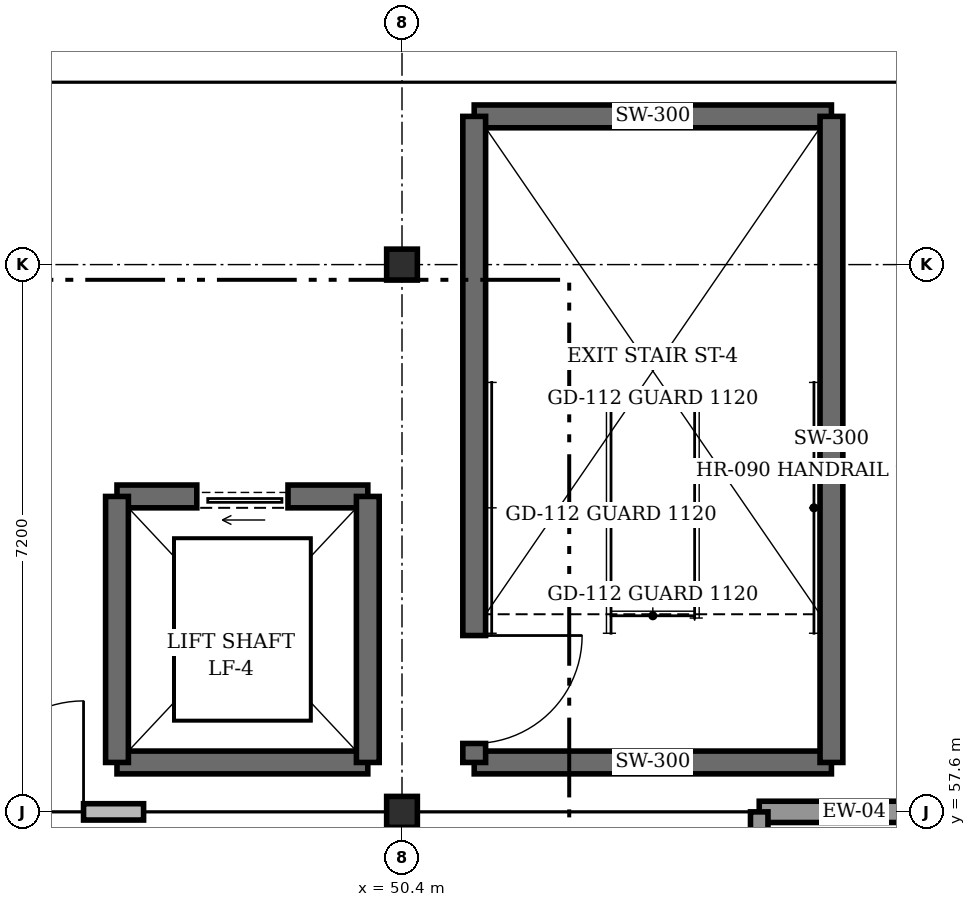
"""IFC4 building model, lengths in metres.
Left out: names, types, materials, properties, quantities, classifications, styles, units other than length and angle.
Written with IfcOpenShell. Run it as: python <this file> out.ifc"""

import sys

from ifc_helpers import new_model, si_unit, direction, frame, frame_2d, origin, origin_2d, place, context, subcontext, project, spatial, rectangle, i_section, extrude, element, fill, save


model = new_model("IFC4")
c1 = context("Model", 3, precision=1e-05, world=origin(), true_north=direction((0.0, 1.0)))
c2 = subcontext(c1, "Body", "Model", "MODEL_VIEW")
j1 = project(units=[si_unit("LENGTHUNIT", "METRE"), si_unit("PLANEANGLEUNIT", "RADIAN")], contexts=[c1])
p1 = place(None, origin())
s1 = spatial("IfcSite", under=j1, at=p1, CompositionType="ELEMENT")
p2 = place(p1, origin())
s2 = spatial("IfcBuilding", under=s1, at=p2, CompositionType="ELEMENT")
p3 = place(p2, frame((0.0, 0.0, 6.0)))
s3 = spatial("IfcBuildingStorey", under=s2, at=p3, CompositionType="ELEMENT", Elevation=6.0)
for number, where, z_axis, x_axis in (
    (1, (50.4, 57.6, 0.0), (0.0, 0.0, 1.0), (1.0, 0.0, 0.0)),
    (2, (50.4, 64.8, 0.0), (0.0, 0.0, 1.0), (1.0, 0.0, 0.0)),
):
    element("IfcColumn", number, at=place(p3, frame(where, z_axis=z_axis, x_axis=x_axis)), inside=s3, PredefinedType="COLUMN", context=c2, shape_type="SweptSolid", body=[
        extrude(i_section(OverallWidth=0.404, OverallDepth=0.407, WebThickness=0.027, FlangeThickness=0.044, at=origin_2d()), origin(), (0.0, 0.0, 1.0), 4.2),
    ])
p4 = place(p3, frame((55.1, 57.6, 0.0), z_axis=(0.0, 0.0, 1.0), x_axis=(1.0, 0.0, 0.0)))
e3 = element("IfcWall", 3, at=p4, inside=s3, PredefinedType="STANDARD", context=c2, shape_type="SweptSolid", body=[
    extrude(rectangle(XDim=2.5, YDim=0.28, at=frame_2d((1.25, 0.0))), origin(), (0.0, 0.0, 1.0), 3.0),
])
p5 = place(p3, frame((55.1, 50.6, 0.0), z_axis=(0.0, 0.0, 1.0), x_axis=(0.0, 1.0, 0.0)))
e4 = element("IfcWall", 4, at=p5, inside=s3, PredefinedType="STANDARD", context=c2, shape_type="SweptSolid", body=[
    extrude(rectangle(XDim=7.0, YDim=0.23, at=frame_2d((3.5, 0.0))), origin(), (0.0, 0.0, 1.0), 3.247),
])
p6 = place(p5, frame((2.82, 0.0, 0.0)))
e5 = element("IfcOpeningElement", 5, at=p6, cuts=e4, PredefinedType="OPENING", context=c2, shape_type="SweptSolid", body=[
    extrude(rectangle(XDim=1.36, YDim=2.22, at=frame_2d((0.68, 1.11))), frame((0.0, 0.125, 0.0), z_axis=(0.0, -1.0, 0.0), x_axis=(1.0, 0.0, 0.0)), (0.0, 0.0, 1.0), 0.25),
])
for number, where, z_axis, x_axis in (
    (6, (51.35, 58.25, 0.0), (0.0, 0.0, 1.0), (1.0, 0.0, 0.0)),
    (7, (56.05, 66.75, 0.0), (0.0, 0.0, 1.0), (-1.0, 0.0, 0.0)),
):
    element("IfcWall", number, at=place(p3, frame(where, z_axis=z_axis, x_axis=x_axis)), inside=s3, PredefinedType="SHEAR", context=c2, shape_type="SweptSolid", body=[
        extrude(rectangle(XDim=4.7, YDim=0.3, at=frame_2d((2.35, 0.0))), origin(), (0.0, 0.0, 1.0), 3.94),
    ])
p7 = place(p3, frame((51.35, 66.75, 0.0), z_axis=(0.0, 0.0, 1.0), x_axis=(0.0, -1.0, 0.0)))
e8 = element("IfcWall", 8, at=p7, inside=s3, PredefinedType="SHEAR", context=c2, shape_type="SweptSolid", body=[
    extrude(rectangle(XDim=8.5, YDim=0.3, at=frame_2d((4.25, 0.0))), origin(), (0.0, 0.0, 1.0), 3.94),
])
p8 = place(p7, frame((6.83, 0.0, 0.0)))
e9 = element("IfcOpeningElement", 9, at=p8, cuts=e8, PredefinedType="OPENING", context=c2, shape_type="SweptSolid", body=[
    extrude(rectangle(XDim=1.42, YDim=2.22, at=frame_2d((0.71, 1.11))), frame((0.0, 0.16, 0.0), z_axis=(0.0, -1.0, 0.0), x_axis=(1.0, 0.0, 0.0)), (0.0, 0.0, 1.0), 0.32),
])
p9 = place(p3, frame((56.05, 58.25, 0.0), z_axis=(0.0, 0.0, 1.0), x_axis=(0.0, 1.0, 0.0)))
e10 = element("IfcWall", 10, at=p9, inside=s3, PredefinedType="SHEAR", context=c2, shape_type="SweptSolid", body=[
    extrude(rectangle(XDim=8.5, YDim=0.3, at=frame_2d((4.25, 0.0))), origin(), (0.0, 0.0, 1.0), 3.94),
])
p10 = place(p3, frame((46.65, 58.25, 0.0), z_axis=(0.0, 0.0, 1.0), x_axis=(1.0, 0.0, 0.0)))
e11 = element("IfcWall", 11, at=p10, inside=s3, PredefinedType="SHEAR", context=c2, shape_type="SweptSolid", body=[
    extrude(rectangle(XDim=3.3, YDim=0.3, at=frame_2d((1.65, 0.0))), origin(), (0.0, 0.0, 1.0), 3.94),
])
p11 = place(p3, frame((49.95, 61.75, 0.0), z_axis=(0.0, 0.0, 1.0), x_axis=(-1.0, 0.0, 0.0)))
e12 = element("IfcWall", 12, at=p11, inside=s3, PredefinedType="SHEAR", context=c2, shape_type="SweptSolid", body=[
    extrude(rectangle(XDim=3.3, YDim=0.3, at=frame_2d((1.65, 0.0))), origin(), (0.0, 0.0, 1.0), 3.94),
])
p12 = place(p11, frame((1.05, 0.0, 0.0)))
e13 = element("IfcOpeningElement", 13, at=p12, cuts=e12, PredefinedType="OPENING", context=c2, shape_type="SweptSolid", body=[
    extrude(rectangle(XDim=1.2, YDim=2.26, at=frame_2d((0.6, 1.13))), frame((0.0, 0.16, 0.0), z_axis=(0.0, -1.0, 0.0), x_axis=(1.0, 0.0, 0.0)), (0.0, 0.0, 1.0), 0.32),
])
for number, where, z_axis, x_axis in (
    (14, (46.65, 61.75, 0.0), (0.0, 0.0, 1.0), (0.0, -1.0, 0.0)),
    (15, (49.95, 58.25, 0.0), (0.0, 0.0, 1.0), (0.0, 1.0, 0.0)),
):
    element("IfcWall", number, at=place(p3, frame(where, z_axis=z_axis, x_axis=x_axis)), inside=s3, PredefinedType="SHEAR", context=c2, shape_type="SweptSolid", body=[
        extrude(rectangle(XDim=3.5, YDim=0.3, at=frame_2d((1.75, 0.0))), origin(), (0.0, 0.0, 1.0), 3.94),
    ])
p13 = place(p3, frame((38.2, 57.6, 0.0), z_axis=(0.0, 0.0, 1.0), x_axis=(1.0, 0.0, 0.0)))
e16 = element("IfcWall", 16, at=p13, inside=s3, PredefinedType="STANDARD", context=c2, shape_type="SweptSolid", body=[
    extrude(rectangle(XDim=8.8, YDim=0.215, at=frame_2d((4.4, 0.0))), origin(), (0.0, 0.0, 1.0), 3.028),
])
p14 = place(p13, frame((6.55, 0.0, 0.0)))
e17 = element("IfcOpeningElement", 17, at=p14, cuts=e16, PredefinedType="OPENING", context=c2, shape_type="SweptSolid", body=[
    extrude(rectangle(XDim=1.46, YDim=2.26, at=frame_2d((0.73, 1.13))), frame((0.0, 0.117, 0.0), z_axis=(0.0, -1.0, 0.0), x_axis=(1.0, 0.0, 0.0)), (0.0, 0.0, 1.0), 0.235),
])
p15 = place(p8, origin())
e18 = element("IfcDoor", 18, at=p15, inside=s3, OperationType="SINGLE_SWING_LEFT", PredefinedType="DOOR", context=c2, shape_type="SweptSolid", body=[
    extrude(rectangle(XDim=1.42, YDim=2.22, at=frame_2d((0.71, 1.11))), frame((0.0, 0.025, 0.0), z_axis=(0.0, -1.0, 0.0), x_axis=(1.0, 0.0, 0.0)), (0.0, 0.0, 1.0), 0.05),
])
fill(e9, e18)
p16 = place(p12, origin())
e19 = element("IfcDoor", 19, at=p16, inside=s3, OperationType="SLIDING_TO_LEFT", PredefinedType="DOOR", context=c2, shape_type="SweptSolid", body=[
    extrude(rectangle(XDim=1.2, YDim=2.26, at=frame_2d((0.6, 1.13))), frame((0.0, 0.025, 0.0), z_axis=(0.0, -1.0, 0.0), x_axis=(1.0, 0.0, 0.0)), (0.0, 0.0, 1.0), 0.05),
])
fill(e13, e19)
p17 = place(p14, origin())
e20 = element("IfcDoor", 20, at=p17, inside=s3, OperationType="SINGLE_SWING_RIGHT", PredefinedType="DOOR", context=c2, shape_type="SweptSolid", body=[
    extrude(rectangle(XDim=1.46, YDim=2.26, at=frame_2d((0.73, 1.13))), frame((0.0, 0.025, 0.0), z_axis=(0.0, -1.0, 0.0), x_axis=(1.0, 0.0, 0.0)), (0.0, 0.0, 1.0), 0.05),
])
fill(e17, e20)
save(model, sys.argv[1])
